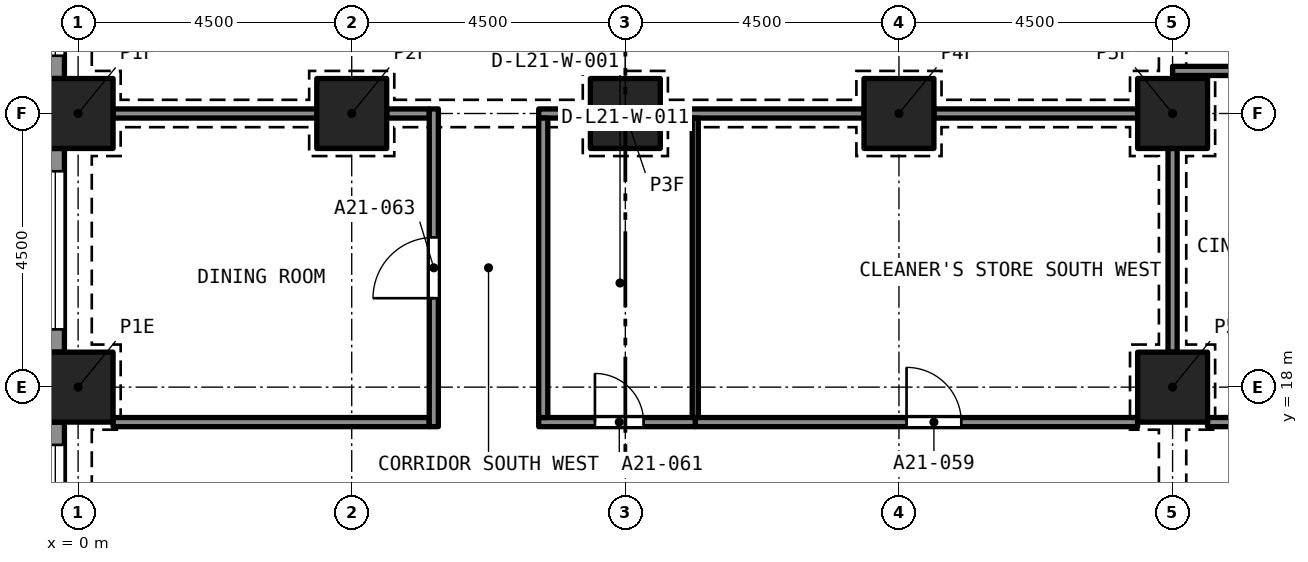
"""IFC4 building model, lengths in metres.
Left out: names, types, materials, properties, quantities, classifications, styles, units other than length and angle.
Written with IfcOpenShell. Run it as: python <this file> out.ifc"""

import sys

from ifc_helpers import new_model, si_unit, direction, frame, frame_2d, origin, origin_2d, place, context, subcontext, project, spatial, rectangle, extrude, element, fill, save


model = new_model("IFC4")
c1 = context("Model", 3, precision=1e-05, world=origin(), true_north=direction((0.0, 1.0)))
c2 = subcontext(c1, "Body", "Model", "MODEL_VIEW")
j1 = project(units=[si_unit("LENGTHUNIT", "METRE"), si_unit("PLANEANGLEUNIT", "RADIAN")], contexts=[c1])
p1 = place(None, origin())
s1 = spatial("IfcSite", under=j1, at=p1, CompositionType="ELEMENT")
p2 = place(p1, origin())
s2 = spatial("IfcBuilding", under=s1, at=p2, CompositionType="ELEMENT")
p3 = place(p2, frame((0.0, 0.0, 80.0)))
s3 = spatial("IfcBuildingStorey", under=s2, at=p3, CompositionType="ELEMENT", Elevation=80.0)
for number, where, z_axis, x_axis in (
    (1, (0.0, 18.0, 0.0), (0.0, 0.0, 1.0), (1.0, 0.0, 0.0)),
    (2, (18.0, 18.0, 0.0), (0.0, 0.0, 1.0), (1.0, 0.0, 0.0)),
    (3, (0.0, 22.5, 0.0), (0.0, 0.0, 1.0), (1.0, 0.0, 0.0)),
    (4, (4.5, 22.5, 0.0), (0.0, 0.0, 1.0), (1.0, 0.0, 0.0)),
    (5, (9.0, 22.5, 0.0), (0.0, 0.0, 1.0), (1.0, 0.0, 0.0)),
    (6, (13.5, 22.5, 0.0), (0.0, 0.0, 1.0), (1.0, 0.0, 0.0)),
    (7, (18.0, 22.5, 0.0), (0.0, 0.0, 1.0), (1.0, 0.0, 0.0)),
):
    element("IfcColumn", number, at=place(p3, frame(where, z_axis=z_axis, x_axis=x_axis)), inside=s3, PredefinedType="COLUMN", context=c2, shape_type="SweptSolid", body=[
        extrude(rectangle(XDim=1.15, YDim=1.15, at=origin_2d()), origin(), (0.0, 0.0, 1.0), 3.2),
    ])
p4 = place(p3, frame((-0.375, 23.075, 0.0), z_axis=(0.0, 0.0, 1.0), x_axis=(0.0, 1.0, 0.0)))
e8 = element("IfcWall", 8, at=p4, inside=s3, PredefinedType="SOLIDWALL", context=c2, shape_type="SweptSolid", body=[
    extrude(rectangle(XDim=3.35, YDim=0.3, at=frame_2d((1.675, 0.0))), origin(), (0.0, 0.0, 1.0), 3.2),
])
p5 = place(p4, frame((0.375, 0.0, 0.45)))
e9 = element("IfcOpeningElement", 9, at=p5, cuts=e8, PredefinedType="OPENING", context=c2, shape_type="SweptSolid", body=[
    extrude(rectangle(XDim=2.6, YDim=1.95, at=frame_2d((1.3, 0.975))), frame((0.0, 0.16, 0.0), z_axis=(0.0, -1.0, 0.0), x_axis=(1.0, 0.0, 0.0)), (0.0, 0.0, 1.0), 0.32),
])
p6 = place(p3, frame((-0.375, 18.575, 0.0), z_axis=(0.0, 0.0, 1.0), x_axis=(0.0, 1.0, 0.0)))
e10 = element("IfcWall", 10, at=p6, inside=s3, PredefinedType="SOLIDWALL", context=c2, shape_type="SweptSolid", body=[
    extrude(rectangle(XDim=3.35, YDim=0.3, at=frame_2d((1.675, 0.0))), origin(), (0.0, 0.0, 1.0), 3.2),
])
p7 = place(p6, frame((0.375, 0.0, 0.45)))
e11 = element("IfcOpeningElement", 11, at=p7, cuts=e10, PredefinedType="OPENING", context=c2, shape_type="SweptSolid", body=[
    extrude(rectangle(XDim=2.6, YDim=1.95, at=frame_2d((1.3, 0.975))), frame((0.0, 0.16, 0.0), z_axis=(0.0, -1.0, 0.0), x_axis=(1.0, 0.0, 0.0)), (0.0, 0.0, 1.0), 0.32),
])
p8 = place(p3, frame((-0.375, 14.075, 0.0), z_axis=(0.0, 0.0, 1.0), x_axis=(0.0, 1.0, 0.0)))
e12 = element("IfcWall", 12, at=p8, inside=s3, PredefinedType="SOLIDWALL", context=c2, shape_type="SweptSolid", body=[
    extrude(rectangle(XDim=3.35, YDim=0.3, at=frame_2d((1.675, 0.0))), origin(), (0.0, 0.0, 1.0), 3.2),
])
p9 = place(p8, frame((0.375, 0.0, 0.45)))
e13 = element("IfcOpeningElement", 13, at=p9, cuts=e12, PredefinedType="OPENING", context=c2, shape_type="SweptSolid", body=[
    extrude(rectangle(XDim=2.6, YDim=1.95, at=frame_2d((1.3, 0.975))), frame((0.0, 0.16, 0.0), z_axis=(0.0, -1.0, 0.0), x_axis=(1.0, 0.0, 0.0)), (0.0, 0.0, 1.0), 0.32),
])
p10 = place(p3, frame((18.575, 17.425, 0.0), z_axis=(0.0, 0.0, 1.0), x_axis=(1.0, 0.0, 0.0)))
e14 = element("IfcWall", 14, at=p10, inside=s3, PredefinedType="PARTITIONING", context=c2, shape_type="SweptSolid", body=[
    extrude(rectangle(XDim=5.2, YDim=0.15, at=frame_2d((2.6, 0.0))), origin(), (0.0, 0.0, 1.0), 2.75),
])
p11 = place(p3, frame((10.15, 17.425, 0.0), z_axis=(0.0, 0.0, 1.0), x_axis=(1.0, 0.0, 0.0)))
e15 = element("IfcWall", 15, at=p11, inside=s3, PredefinedType="PARTITIONING", context=c2, shape_type="SweptSolid", body=[
    extrude(rectangle(XDim=7.275, YDim=0.15, at=frame_2d((3.638, 0.0))), origin(), (0.0, 0.0, 1.0), 2.9),
])
p12 = place(p11, frame((3.475, 0.0, 0.0)))
e16 = element("IfcOpeningElement", 16, at=p12, cuts=e15, PredefinedType="OPENING", context=c2, shape_type="SweptSolid", body=[
    extrude(rectangle(XDim=0.9, YDim=2.1, at=frame_2d((0.45, 1.05))), frame((0.0, 0.085, 0.0), z_axis=(0.0, -1.0, 0.0), x_axis=(1.0, 0.0, 0.0)), (0.0, 0.0, 1.0), 0.17),
])
p13 = place(p3, frame((7.575, 17.425, 0.0), z_axis=(0.0, 0.0, 1.0), x_axis=(1.0, 0.0, 0.0)))
e17 = element("IfcWall", 17, at=p13, inside=s3, PredefinedType="PARTITIONING", context=c2, shape_type="SweptSolid", body=[
    extrude(rectangle(XDim=2.575, YDim=0.15, at=frame_2d((1.288, 0.0))), origin(), (0.0, 0.0, 1.0), 2.9),
])
p14 = place(p13, frame((0.925, 0.0, 0.0)))
e18 = element("IfcOpeningElement", 18, at=p14, cuts=e17, PredefinedType="OPENING", context=c2, shape_type="SweptSolid", body=[
    extrude(rectangle(XDim=0.8, YDim=2.1, at=frame_2d((0.4, 1.05))), frame((0.0, 0.085, 0.0), z_axis=(0.0, -1.0, 0.0), x_axis=(1.0, 0.0, 0.0)), (0.0, 0.0, 1.0), 0.17),
])
p15 = place(p3, frame((0.575, 17.425, 0.0), z_axis=(0.0, 0.0, 1.0), x_axis=(1.0, 0.0, 0.0)))
e19 = element("IfcWall", 19, at=p15, inside=s3, PredefinedType="PARTITIONING", context=c2, shape_type="SweptSolid", body=[
    extrude(rectangle(XDim=5.2, YDim=0.15, at=frame_2d((2.6, 0.0))), origin(), (0.0, 0.0, 1.0), 2.9),
])
p16 = place(p3, frame((18.0, 23.2, 0.0), z_axis=(0.0, 0.0, 1.0), x_axis=(1.0, 0.0, 0.0)))
e20 = element("IfcWall", 20, at=p16, inside=s3, PredefinedType="PARTITIONING", context=c2, shape_type="SweptSolid", body=[
    extrude(rectangle(XDim=5.775, YDim=0.15, at=frame_2d((2.887, 0.0))), origin(), (0.0, 0.0, 1.0), 2.75),
])
for number, where, z_axis, x_axis in (
    (21, (18.0, 18.575, 0.0), (0.0, 0.0, 1.0), (0.0, 1.0, 0.0)),
    (22, (14.075, 22.5, 0.0), (0.0, 0.0, 1.0), (1.0, 0.0, 0.0)),
    (23, (9.575, 22.5, 0.0), (0.0, 0.0, 1.0), (1.0, 0.0, 0.0)),
):
    element("IfcWall", number, at=place(p3, frame(where, z_axis=z_axis, x_axis=x_axis)), inside=s3, PredefinedType="PARTITIONING", context=c2, shape_type="SweptSolid", body=[
        extrude(rectangle(XDim=3.35, YDim=0.15, at=frame_2d((1.675, 0.0))), origin(), (0.0, 0.0, 1.0), 2.38),
    ])
p17 = place(p3, frame((7.575, 22.5, 0.0), z_axis=(0.0, 0.0, 1.0), x_axis=(1.0, 0.0, 0.0)))
e24 = element("IfcWall", 24, at=p17, inside=s3, PredefinedType="PARTITIONING", context=c2, shape_type="SweptSolid", body=[
    extrude(rectangle(XDim=0.85, YDim=0.15, at=frame_2d((0.425, 0.0))), origin(), (0.0, 0.0, 1.0), 2.38),
])
p18 = place(p3, frame((5.075, 22.5, 0.0), z_axis=(0.0, 0.0, 1.0), x_axis=(1.0, 0.0, 0.0)))
e25 = element("IfcWall", 25, at=p18, inside=s3, PredefinedType="PARTITIONING", context=c2, shape_type="SweptSolid", body=[
    extrude(rectangle(XDim=0.7, YDim=0.15, at=frame_2d((0.35, 0.0))), origin(), (0.0, 0.0, 1.0), 2.38),
])
p19 = place(p3, frame((0.575, 22.5, 0.0), z_axis=(0.0, 0.0, 1.0), x_axis=(1.0, 0.0, 0.0)))
e26 = element("IfcWall", 26, at=p19, inside=s3, PredefinedType="PARTITIONING", context=c2, shape_type="SweptSolid", body=[
    extrude(rectangle(XDim=3.35, YDim=0.15, at=frame_2d((1.675, 0.0))), origin(), (0.0, 0.0, 1.0), 2.38),
])
p20 = place(p3, frame((7.65, 17.5, 0.0), z_axis=(0.0, 0.0, 1.0), x_axis=(0.0, 1.0, 0.0)))
e27 = element("IfcWall", 27, at=p20, inside=s3, PredefinedType="PARTITIONING", context=c2, shape_type="SweptSolid", body=[
    extrude(rectangle(XDim=4.925, YDim=0.15, at=frame_2d((2.462, 0.0))), origin(), (0.0, 0.0, 1.0), 2.9),
])
p21 = place(p3, frame((5.85, 17.35, 0.0), z_axis=(0.0, 0.0, 1.0), x_axis=(0.0, 1.0, 0.0)))
e28 = element("IfcWall", 28, at=p21, inside=s3, PredefinedType="PARTITIONING", context=c2, shape_type="SweptSolid", body=[
    extrude(rectangle(XDim=5.225, YDim=0.15, at=frame_2d((2.612, 0.0))), origin(), (0.0, 0.0, 1.0), 2.9),
])
p22 = place(p21, frame((2.113, 0.0, 0.0)))
e29 = element("IfcOpeningElement", 29, at=p22, cuts=e28, PredefinedType="OPENING", context=c2, shape_type="SweptSolid", body=[
    extrude(rectangle(XDim=1.0, YDim=2.1, at=frame_2d((0.5, 1.05))), frame((0.0, 0.085, 0.0), z_axis=(0.0, -1.0, 0.0), x_axis=(1.0, 0.0, 0.0)), (0.0, 0.0, 1.0), 0.17),
])
p23 = place(p3, frame((10.15, 17.5, 0.0), z_axis=(0.0, 0.0, 1.0), x_axis=(0.0, 1.0, 0.0)))
e30 = element("IfcWall", 30, at=p23, inside=s3, PredefinedType="PARTITIONING", context=c2, shape_type="SweptSolid", body=[
    extrude(rectangle(XDim=4.925, YDim=0.1, at=frame_2d((2.462, 0.0))), origin(), (0.0, 0.0, 1.0), 2.9),
])
p24 = place(p5, origin())
e31 = element("IfcWindow", 31, at=p24, inside=s3, PartitioningType="SINGLE_PANEL", PredefinedType="WINDOW", context=c2, shape_type="SweptSolid", body=[
    extrude(rectangle(XDim=2.6, YDim=1.95, at=frame_2d((1.3, 0.975))), frame((0.0, 0.03, 0.0), z_axis=(0.0, -1.0, 0.0), x_axis=(1.0, 0.0, 0.0)), (0.0, 0.0, 1.0), 0.06),
])
fill(e9, e31)
p25 = place(p7, origin())
e32 = element("IfcWindow", 32, at=p25, inside=s3, PartitioningType="SINGLE_PANEL", PredefinedType="WINDOW", context=c2, shape_type="SweptSolid", body=[
    extrude(rectangle(XDim=2.6, YDim=1.95, at=frame_2d((1.3, 0.975))), frame((0.0, 0.03, 0.0), z_axis=(0.0, -1.0, 0.0), x_axis=(1.0, 0.0, 0.0)), (0.0, 0.0, 1.0), 0.06),
])
fill(e11, e32)
p26 = place(p9, origin())
e33 = element("IfcWindow", 33, at=p26, inside=s3, PartitioningType="SINGLE_PANEL", PredefinedType="WINDOW", context=c2, shape_type="SweptSolid", body=[
    extrude(rectangle(XDim=2.6, YDim=1.95, at=frame_2d((1.3, 0.975))), frame((0.0, 0.03, 0.0), z_axis=(0.0, -1.0, 0.0), x_axis=(1.0, 0.0, 0.0)), (0.0, 0.0, 1.0), 0.06),
])
fill(e13, e33)
p27 = place(p12, origin())
e34 = element("IfcDoor", 34, at=p27, inside=s3, OperationType="SINGLE_SWING_RIGHT", PredefinedType="DOOR", context=c2, shape_type="SweptSolid", body=[
    extrude(rectangle(XDim=0.9, YDim=2.1, at=frame_2d((0.45, 1.05))), frame((0.0, 0.025, 0.0), z_axis=(0.0, -1.0, 0.0), x_axis=(1.0, 0.0, 0.0)), (0.0, 0.0, 1.0), 0.05),
])
fill(e16, e34)
p28 = place(p14, origin())
e35 = element("IfcDoor", 35, at=p28, inside=s3, OperationType="SINGLE_SWING_RIGHT", PredefinedType="DOOR", context=c2, shape_type="SweptSolid", body=[
    extrude(rectangle(XDim=0.8, YDim=2.1, at=frame_2d((0.4, 1.05))), frame((0.0, 0.025, 0.0), z_axis=(0.0, -1.0, 0.0), x_axis=(1.0, 0.0, 0.0)), (0.0, 0.0, 1.0), 0.05),
])
fill(e18, e35)
p29 = place(p22, origin())
e36 = element("IfcDoor", 36, at=p29, inside=s3, OperationType="SINGLE_SWING_LEFT", PredefinedType="DOOR", context=c2, shape_type="SweptSolid", body=[
    extrude(rectangle(XDim=1.0, YDim=2.1, at=frame_2d((0.5, 1.05))), frame((0.0, 0.025, 0.0), z_axis=(0.0, -1.0, 0.0), x_axis=(1.0, 0.0, 0.0)), (0.0, 0.0, 1.0), 0.05),
])
fill(e29, e36)
save(model, sys.argv[1])
